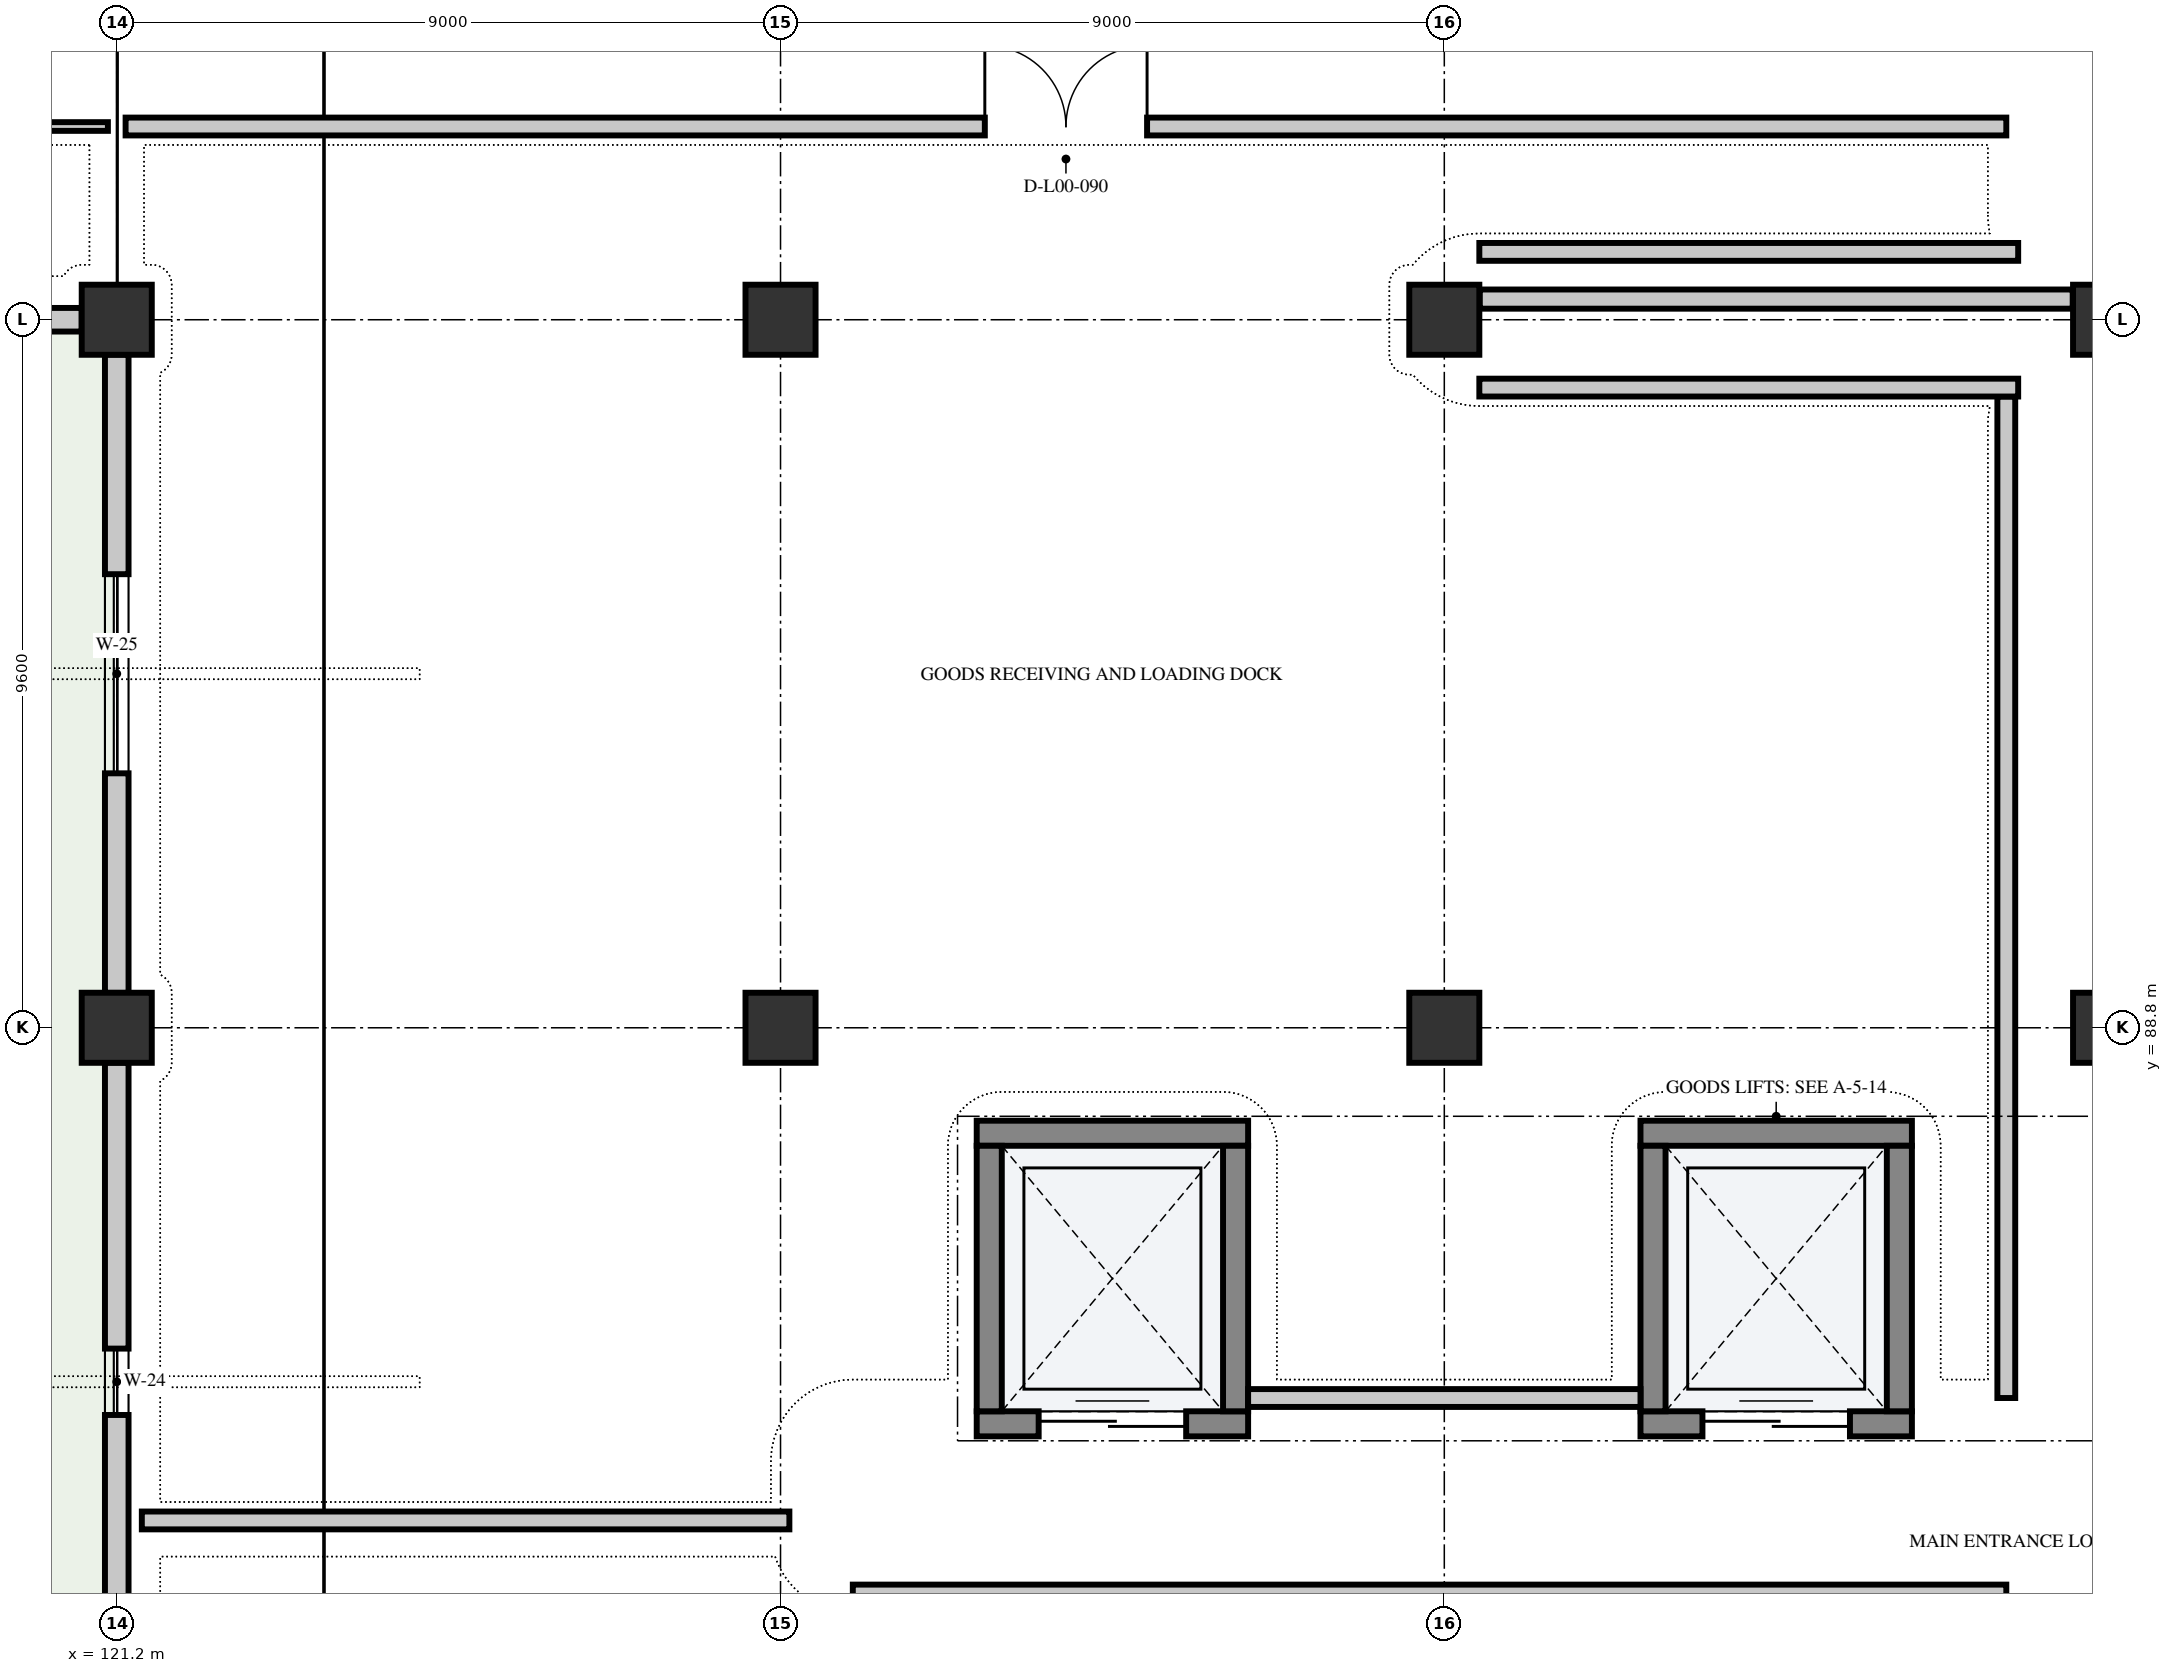
"""IFC4 building model, lengths in metres.
Left out: names, types, materials, properties, quantities, classifications, styles, units other than length and angle.
Written with IfcOpenShell. Run it as: python <this file> out.ifc"""

import sys

from ifc_helpers import new_model, si_unit, direction, frame, frame_2d, origin, origin_2d, place, context, subcontext, project, spatial, rectangle, extrude, element, fill, save


model = new_model("IFC4")
c1 = context("Model", 3, precision=1e-05, world=origin(), true_north=direction((0.0, 1.0)))
c2 = subcontext(c1, "Body", "Model", "MODEL_VIEW")
j1 = project(units=[si_unit("LENGTHUNIT", "METRE"), si_unit("PLANEANGLEUNIT", "RADIAN")], contexts=[c1])
p1 = place(None, origin())
s1 = spatial("IfcSite", under=j1, at=p1, CompositionType="ELEMENT")
p2 = place(p1, origin())
s2 = spatial("IfcBuilding", under=s1, at=p2, CompositionType="ELEMENT")
p3 = place(p2, origin())
s3 = spatial("IfcBuildingStorey", under=s2, at=p3, CompositionType="ELEMENT", Elevation=0.0)
for number, where, z_axis, x_axis in (
    (1, (121.2, 88.8, 0.0), (0.0, 0.0, 1.0), (1.0, 0.0, 0.0)),
    (2, (121.2, 98.4, 0.0), (0.0, 0.0, 1.0), (1.0, 0.0, 0.0)),
    (3, (130.2, 88.8, 0.0), (0.0, 0.0, 1.0), (1.0, 0.0, 0.0)),
    (4, (130.2, 98.4, 0.0), (0.0, 0.0, 1.0), (1.0, 0.0, 0.0)),
    (5, (139.2, 88.8, 0.0), (0.0, 0.0, 1.0), (1.0, 0.0, 0.0)),
    (6, (139.2, 98.4, 0.0), (0.0, 0.0, 1.0), (1.0, 0.0, 0.0)),
    (7, (148.2, 88.8, 0.0), (0.0, 0.0, 1.0), (1.0, 0.0, 0.0)),
    (8, (148.2, 98.4, 0.0), (0.0, 0.0, 1.0), (1.0, 0.0, 0.0)),
):
    element("IfcColumn", number, at=place(p3, frame(where, z_axis=z_axis, x_axis=x_axis)), inside=s3, PredefinedType="COLUMN", context=c2, shape_type="SweptSolid", body=[
        extrude(rectangle(XDim=0.95, YDim=0.95, at=origin_2d()), origin(), (0.0, 0.0, 1.0), 5.4),
    ])
p4 = place(p3, frame((120.725, 98.4, 0.0), z_axis=(0.0, 0.0, 1.0), x_axis=(-1.0, 0.0, 0.0)))
e9 = element("IfcWall", 9, at=p4, inside=s3, PredefinedType="SOLIDWALL", context=c2, shape_type="SweptSolid", body=[
    extrude(rectangle(XDim=8.05, YDim=0.32, at=frame_2d((4.025, 0.0))), origin(), (0.0, 0.0, 1.0), 4.03),
])
p5 = place(p4, frame((2.825, 0.0, 0.0)))
e10 = element("IfcOpeningElement", 10, at=p5, cuts=e9, PredefinedType="OPENING", context=c2, shape_type="SweptSolid", body=[
    extrude(rectangle(XDim=2.4, YDim=2.8, at=frame_2d((1.2, 1.4))), frame((0.0, 0.172, 0.0), z_axis=(0.0, -1.0, 0.0), x_axis=(1.0, 0.0, 0.0)), (0.0, 0.0, 1.0), 0.344),
])
p6 = place(p3, frame((121.2, 79.673, 0.0), z_axis=(0.0, 0.0, 1.0), x_axis=(0.0, 1.0, 0.0)))
e11 = element("IfcWall", 11, at=p6, inside=s3, PredefinedType="SOLIDWALL", context=c2, shape_type="SweptSolid", body=[
    extrude(rectangle(XDim=8.654, YDim=0.32, at=frame_2d((4.327, 0.0))), origin(), (0.0, 0.0, 1.0), 4.03),
])
p7 = place(p6, frame((3.877, 0.0, 1.15)))
e12 = element("IfcOpeningElement", 12, at=p7, cuts=e11, PredefinedType="OPENING", context=c2, shape_type="SweptSolid", body=[
    extrude(rectangle(XDim=0.9, YDim=1.6, at=frame_2d((0.45, 0.8))), frame((0.0, 0.172, 0.0), z_axis=(0.0, -1.0, 0.0), x_axis=(1.0, 0.0, 0.0)), (0.0, 0.0, 1.0), 0.344),
])
p8 = place(p3, frame((121.2, 89.273, 0.0), z_axis=(0.0, 0.0, 1.0), x_axis=(0.0, 1.0, 0.0)))
e13 = element("IfcWall", 13, at=p8, inside=s3, PredefinedType="SOLIDWALL", context=c2, shape_type="SweptSolid", body=[
    extrude(rectangle(XDim=8.654, YDim=0.32, at=frame_2d((4.327, 0.0))), origin(), (0.0, 0.0, 1.0), 4.03),
])
p9 = place(p8, frame((2.977, 0.0, 1.0)))
e14 = element("IfcOpeningElement", 14, at=p9, cuts=e13, PredefinedType="OPENING", context=c2, shape_type="SweptSolid", body=[
    extrude(rectangle(XDim=2.7, YDim=2.0, at=frame_2d((1.35, 1.0))), frame((0.0, 0.172, 0.0), z_axis=(0.0, -1.0, 0.0), x_axis=(1.0, 0.0, 0.0)), (0.0, 0.0, 1.0), 0.344),
])
p10 = place(p3, frame((132.86, 83.43, 0.0), z_axis=(0.0, 0.0, 1.0), x_axis=(1.0, 0.0, 0.0)))
e15 = element("IfcWall", 15, at=p10, inside=s3, PredefinedType="SHEAR", context=c2, shape_type="SweptSolid", body=[
    extrude(rectangle(XDim=3.68, YDim=0.34, at=frame_2d((1.84, 0.0))), origin(), (0.0, 0.0, 1.0), 5.09),
])
p11 = place(p10, frame((0.84, 0.0, 0.0)))
e16 = element("IfcOpeningElement", 16, at=p11, cuts=e15, PredefinedType="OPENING", context=c2, shape_type="SweptSolid", body=[
    extrude(rectangle(XDim=2.0, YDim=2.4, at=frame_2d((1.0, 1.2))), frame((0.0, 0.182, 0.0), z_axis=(0.0, -1.0, 0.0), x_axis=(1.0, 0.0, 0.0)), (0.0, 0.0, 1.0), 0.364),
])
p12 = place(p3, frame((132.86, 87.37, 0.0), z_axis=(0.0, 0.0, 1.0), x_axis=(1.0, 0.0, 0.0)))
e17 = element("IfcWall", 17, at=p12, inside=s3, PredefinedType="SHEAR", context=c2, shape_type="SweptSolid", body=[
    extrude(rectangle(XDim=3.68, YDim=0.34, at=frame_2d((1.84, 0.0))), origin(), (0.0, 0.0, 1.0), 5.09),
])
for number, where, z_axis, x_axis in (
    (18, (133.03, 83.6, 0.0), (0.0, 0.0, 1.0), (0.0, 1.0, 0.0)),
    (19, (136.37, 83.6, 0.0), (0.0, 0.0, 1.0), (0.0, 1.0, 0.0)),
):
    element("IfcWall", number, at=place(p3, frame(where, z_axis=z_axis, x_axis=x_axis)), inside=s3, PredefinedType="SHEAR", context=c2, shape_type="SweptSolid", body=[
        extrude(rectangle(XDim=3.6, YDim=0.34, at=frame_2d((1.8, 0.0))), origin(), (0.0, 0.0, 1.0), 5.09),
    ])
p13 = place(p3, frame((141.86, 83.43, 0.0), z_axis=(0.0, 0.0, 1.0), x_axis=(1.0, 0.0, 0.0)))
e20 = element("IfcWall", 20, at=p13, inside=s3, PredefinedType="SHEAR", context=c2, shape_type="SweptSolid", body=[
    extrude(rectangle(XDim=3.68, YDim=0.34, at=frame_2d((1.84, 0.0))), origin(), (0.0, 0.0, 1.0), 5.09),
])
p14 = place(p13, frame((0.84, 0.0, 0.0)))
e21 = element("IfcOpeningElement", 21, at=p14, cuts=e20, PredefinedType="OPENING", context=c2, shape_type="SweptSolid", body=[
    extrude(rectangle(XDim=2.0, YDim=2.4, at=frame_2d((1.0, 1.2))), frame((0.0, 0.182, 0.0), z_axis=(0.0, -1.0, 0.0), x_axis=(1.0, 0.0, 0.0)), (0.0, 0.0, 1.0), 0.364),
])
p15 = place(p3, frame((141.86, 87.37, 0.0), z_axis=(0.0, 0.0, 1.0), x_axis=(1.0, 0.0, 0.0)))
e22 = element("IfcWall", 22, at=p15, inside=s3, PredefinedType="SHEAR", context=c2, shape_type="SweptSolid", body=[
    extrude(rectangle(XDim=3.68, YDim=0.34, at=frame_2d((1.84, 0.0))), origin(), (0.0, 0.0, 1.0), 5.09),
])
for number, where, z_axis, x_axis in (
    (23, (142.03, 83.6, 0.0), (0.0, 0.0, 1.0), (0.0, 1.0, 0.0)),
    (24, (145.37, 83.6, 0.0), (0.0, 0.0, 1.0), (0.0, 1.0, 0.0)),
):
    element("IfcWall", number, at=place(p3, frame(where, z_axis=z_axis, x_axis=x_axis)), inside=s3, PredefinedType="SHEAR", context=c2, shape_type="SweptSolid", body=[
        extrude(rectangle(XDim=3.6, YDim=0.34, at=frame_2d((1.8, 0.0))), origin(), (0.0, 0.0, 1.0), 5.09),
    ])
p16 = place(p3, frame((139.68, 98.68, 0.0), z_axis=(0.0, 0.0, 1.0), x_axis=(1.0, 0.0, 0.0)))
e25 = element("IfcWall", 25, at=p16, inside=s3, PredefinedType="PARTITIONING", context=c2, shape_type="SweptSolid", body=[
    extrude(rectangle(XDim=8.04, YDim=0.26, at=frame_2d((4.02, 0.0))), origin(), (0.0, 0.0, 1.0), 4.03),
])
p17 = place(p3, frame((108.589, 101.02, 0.0), z_axis=(0.0, 0.0, 1.0), x_axis=(1.0, 0.0, 0.0)))
e26 = element("IfcWall", 26, at=p17, inside=s3, PredefinedType="PARTITIONING", context=c2, shape_type="SweptSolid", body=[
    extrude(rectangle(XDim=12.491, YDim=0.118, at=frame_2d((6.246, 0.0))), origin(), (0.0, 0.0, 1.0), 4.03),
])
p18 = place(p3, frame((121.32, 101.02, 0.0), z_axis=(0.0, 0.0, 1.0), x_axis=(1.0, 0.0, 0.0)))
e27 = element("IfcWall", 27, at=p18, inside=s3, PredefinedType="PARTITIONING", context=c2, shape_type="SweptSolid", body=[
    extrude(rectangle(XDim=25.5, YDim=0.242, at=frame_2d((12.75, 0.0))), origin(), (0.0, 0.0, 1.0), 4.03),
])
p19 = place(p18, frame((11.65, 0.0, 0.0)))
e28 = element("IfcOpeningElement", 28, at=p19, cuts=e27, PredefinedType="OPENING", context=c2, shape_type="SweptSolid", body=[
    extrude(rectangle(XDim=2.2, YDim=2.5, at=frame_2d((1.1, 1.25))), frame((0.0, 0.133, 0.0), z_axis=(0.0, -1.0, 0.0), x_axis=(1.0, 0.0, 0.0)), (0.0, 0.0, 1.0), 0.266),
])
p20 = place(p3, frame((146.82, 97.359, 0.0), z_axis=(0.0, 0.0, 1.0), x_axis=(0.0, -1.0, 0.0)))
e29 = element("IfcWall", 29, at=p20, inside=s3, PredefinedType="PARTITIONING", context=c2, shape_type="SweptSolid", body=[
    extrude(rectangle(XDim=13.579, YDim=0.242, at=frame_2d((6.79, 0.0))), origin(), (0.0, 0.0, 1.0), 4.03),
])
p21 = place(p3, frame((130.32, 82.12, 0.0), z_axis=(0.0, 0.0, 1.0), x_axis=(-1.0, 0.0, 0.0)))
e30 = element("IfcWall", 30, at=p21, inside=s3, PredefinedType="PARTITIONING", context=c2, shape_type="SweptSolid", body=[
    extrude(rectangle(XDim=8.78, YDim=0.242, at=frame_2d((4.39, 0.0))), origin(), (0.0, 0.0, 1.0), 4.03),
])
for number, where, z_axis, x_axis in (
    (31, (139.675, 97.48, 0.0), (0.0, 0.0, 1.0), (1.0, 0.0, 0.0)),
    (32, (146.981, 99.32, 0.0), (0.0, 0.0, 1.0), (-1.0, 0.0, 0.0)),
):
    element("IfcWall", number, at=place(p3, frame(where, z_axis=z_axis, x_axis=x_axis)), inside=s3, PredefinedType="PARTITIONING", context=c2, shape_type="SweptSolid", body=[
        extrude(rectangle(XDim=7.306, YDim=0.242, at=frame_2d((3.653, 0.0))), origin(), (0.0, 0.0, 1.0), 5.09),
    ])
p22 = place(p3, frame((141.86, 83.78, 0.0), z_axis=(0.0, 0.0, 1.0), x_axis=(-1.0, 0.0, 0.0)))
e33 = element("IfcWall", 33, at=p22, inside=s3, PredefinedType="PARTITIONING", context=c2, shape_type="SweptSolid", body=[
    extrude(rectangle(XDim=5.32, YDim=0.242, at=frame_2d((2.66, 0.0))), origin(), (0.0, 0.0, 1.0), 4.03),
])
p23 = place(p3, frame((131.18, 81.12, 0.0), z_axis=(0.0, 0.0, 1.0), x_axis=(1.0, 0.0, 0.0)))
e34 = element("IfcWall", 34, at=p23, inside=s3, PredefinedType="PARTITIONING", context=c2, shape_type="SweptSolid", body=[
    extrude(rectangle(XDim=15.64, YDim=0.26, at=frame_2d((7.82, 0.0))), origin(), (0.0, 0.0, 1.0), 4.03),
])
p24 = place(p7, origin())
e35 = element("IfcWindow", 35, at=p24, inside=s3, PartitioningType="SINGLE_PANEL", PredefinedType="WINDOW", context=c2, shape_type="SweptSolid", body=[
    extrude(rectangle(XDim=0.9, YDim=1.6, at=frame_2d((0.45, 0.8))), frame((0.0, 0.03, 0.0), z_axis=(0.0, -1.0, 0.0), x_axis=(1.0, 0.0, 0.0)), (0.0, 0.0, 1.0), 0.06),
])
fill(e12, e35)
p25 = place(p9, origin())
e36 = element("IfcWindow", 36, at=p25, inside=s3, PartitioningType="SINGLE_PANEL", PredefinedType="WINDOW", context=c2, shape_type="SweptSolid", body=[
    extrude(rectangle(XDim=2.7, YDim=2.0, at=frame_2d((1.35, 1.0))), frame((0.0, 0.03, 0.0), z_axis=(0.0, -1.0, 0.0), x_axis=(1.0, 0.0, 0.0)), (0.0, 0.0, 1.0), 0.06),
])
fill(e14, e36)
p26 = place(p11, origin())
e37 = element("IfcDoor", 37, at=p26, inside=s3, OperationType="DOUBLE_DOOR_SLIDING", PredefinedType="DOOR", context=c2, shape_type="SweptSolid", body=[
    extrude(rectangle(XDim=2.0, YDim=2.4, at=frame_2d((1.0, 1.2))), frame((0.0, 0.025, 0.0), z_axis=(0.0, -1.0, 0.0), x_axis=(1.0, 0.0, 0.0)), (0.0, 0.0, 1.0), 0.05),
])
fill(e16, e37)
p27 = place(p14, origin())
e38 = element("IfcDoor", 38, at=p27, inside=s3, OperationType="DOUBLE_DOOR_SLIDING", PredefinedType="DOOR", context=c2, shape_type="SweptSolid", body=[
    extrude(rectangle(XDim=2.0, YDim=2.4, at=frame_2d((1.0, 1.2))), frame((0.0, 0.025, 0.0), z_axis=(0.0, -1.0, 0.0), x_axis=(1.0, 0.0, 0.0)), (0.0, 0.0, 1.0), 0.05),
])
fill(e21, e38)
p28 = place(p19, origin())
e39 = element("IfcDoor", 39, at=p28, inside=s3, OperationType="DOUBLE_DOOR_SINGLE_SWING", PredefinedType="DOOR", context=c2, shape_type="SweptSolid", body=[
    extrude(rectangle(XDim=2.2, YDim=2.5, at=frame_2d((1.1, 1.25))), frame((0.0, 0.025, 0.0), z_axis=(0.0, -1.0, 0.0), x_axis=(1.0, 0.0, 0.0)), (0.0, 0.0, 1.0), 0.05),
])
fill(e28, e39)
save(model, sys.argv[1])
